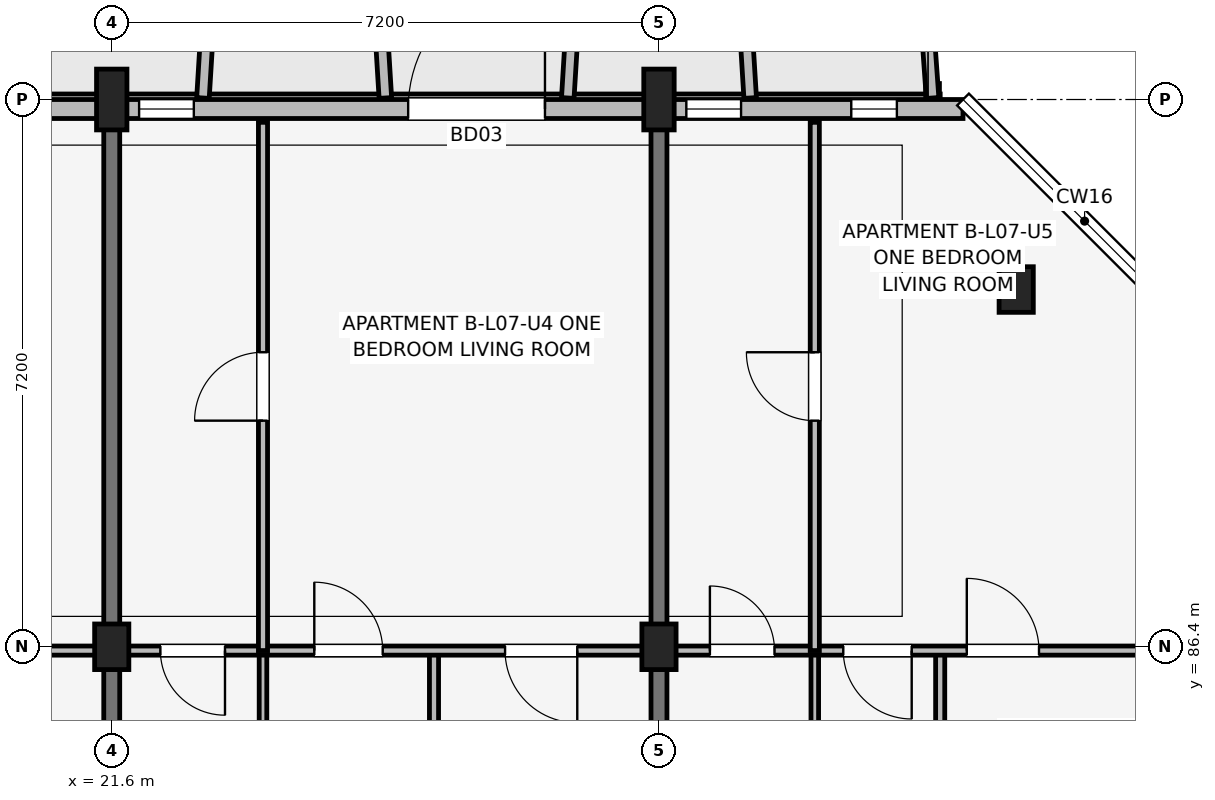
"""IFC4 building model, lengths in metres.
Left out: names, types, materials, properties, quantities, classifications, styles, units other than length and angle.
Written with IfcOpenShell. Run it as: python <this file> out.ifc"""

import sys

from ifc_helpers import new_model, si_unit, direction, frame, frame_2d, origin, origin_2d, place, context, subcontext, project, spatial, rectangle, extrude, element, fill, save


model = new_model("IFC4")
c1 = context("Model", 3, precision=1e-05, world=origin(), true_north=direction((0.0, 1.0)))
c2 = subcontext(c1, "Body", "Model", "MODEL_VIEW")
j1 = project(units=[si_unit("LENGTHUNIT", "METRE"), si_unit("PLANEANGLEUNIT", "RADIAN")], contexts=[c1])
p1 = place(None, origin())
s1 = spatial("IfcSite", under=j1, at=p1, CompositionType="ELEMENT")
p2 = place(p1, origin())
s2 = spatial("IfcBuilding", under=s1, at=p2, CompositionType="ELEMENT")
p3 = place(p2, frame((0.0, 0.0, 24.45)))
s3 = spatial("IfcBuildingStorey", under=s2, at=p3, CompositionType="ELEMENT", Elevation=24.45)
p4 = place(p3, frame((21.6, 86.4, 0.0), z_axis=(0.0, 0.0, 1.0), x_axis=(1.0, 0.0, 0.0)))
e1 = element("IfcColumn", 1, at=p4, inside=s3, PredefinedType="COLUMN", context=c2, shape_type="SweptSolid", body=[
    extrude(rectangle(XDim=0.45, YDim=0.6, at=origin_2d()), origin(), (0.0, 0.0, 1.0), 3.15),
])
p5 = place(p3, frame((21.6, 93.6, 0.0), z_axis=(0.0, 0.0, 1.0), x_axis=(1.0, 0.0, 0.0)))
e2 = element("IfcColumn", 2, at=p5, inside=s3, PredefinedType="COLUMN", context=c2, shape_type="SweptSolid", body=[
    extrude(rectangle(XDim=0.4, YDim=0.8, at=origin_2d()), origin(), (0.0, 0.0, 1.0), 3.15),
])
p6 = place(p3, frame((28.8, 86.4, 0.0), z_axis=(0.0, 0.0, 1.0), x_axis=(1.0, 0.0, 0.0)))
e3 = element("IfcColumn", 3, at=p6, inside=s3, PredefinedType="COLUMN", context=c2, shape_type="SweptSolid", body=[
    extrude(rectangle(XDim=0.45, YDim=0.6, at=origin_2d()), origin(), (0.0, 0.0, 1.0), 3.15),
])
p7 = place(p3, frame((28.8, 93.6, 0.0), z_axis=(0.0, 0.0, 1.0), x_axis=(1.0, 0.0, 0.0)))
e4 = element("IfcColumn", 4, at=p7, inside=s3, PredefinedType="COLUMN", context=c2, shape_type="SweptSolid", body=[
    extrude(rectangle(XDim=0.4, YDim=0.8, at=origin_2d()), origin(), (0.0, 0.0, 1.0), 3.15),
])
p8 = place(p3, frame((33.5, 91.1, 0.0), z_axis=(0.0, 0.0, 1.0), x_axis=(1.0, 0.0, 0.0)))
e5 = element("IfcColumn", 5, at=p8, inside=s3, PredefinedType="COLUMN", context=c2, shape_type="SweptSolid", body=[
    extrude(rectangle(XDim=0.45, YDim=0.6, at=origin_2d()), origin(), (0.0, 0.0, 1.0), 3.15),
])
for number, where, z_axis, x_axis in (
    (6, (21.6, 83.85, 0.0), (0.0, 0.0, 1.0), (0.0, 1.0, 0.0)),
    (7, (28.8, 83.85, 0.0), (0.0, 0.0, 1.0), (0.0, 1.0, 0.0)),
):
    element("IfcWall", number, at=place(p3, frame(where, z_axis=z_axis, x_axis=x_axis)), inside=s3, PredefinedType="SHEAR", context=c2, shape_type="SweptSolid", body=[
        extrude(rectangle(XDim=9.4, YDim=0.21, at=frame_2d((4.7, 0.0))), origin(), (0.0, 0.0, 1.0), 3.15),
    ])
p9 = place(p3, frame((32.8, 93.475, 0.0), z_axis=(0.0, 0.0, 1.0), x_axis=(-1.0, 0.0, 0.0)))
e8 = element("IfcWall", 8, at=p9, inside=s3, PredefinedType="SOLIDWALL", context=c2, shape_type="SweptSolid", body=[
    extrude(rectangle(XDim=29.6, YDim=0.25, at=frame_2d((14.8, 0.0))), origin(), (0.0, 0.0, 1.0), 2.43),
])
p10 = place(p9, frame((21.55, 0.0, 0.0), z_axis=(0.0, 0.0, 1.0), x_axis=(-1.0, 0.0, 0.0)))
e9 = element("IfcOpeningElement", 9, at=p10, cuts=e8, PredefinedType="OPENING", context=c2, shape_type="SweptSolid", body=[
    extrude(rectangle(XDim=1.5, YDim=2.15, at=frame_2d((0.75, 1.075))), frame((0.0, 0.135, 0.0), z_axis=(0.0, -1.0, 0.0), x_axis=(1.0, 0.0, 0.0)), (0.0, 0.0, 1.0), 0.27),
])
p11 = place(p9, frame((7.3, 0.0, 0.0), z_axis=(0.0, 0.0, 1.0), x_axis=(-1.0, 0.0, 0.0)))
e10 = element("IfcOpeningElement", 10, at=p11, cuts=e8, PredefinedType="OPENING", context=c2, shape_type="SweptSolid", body=[
    extrude(rectangle(XDim=1.8, YDim=2.15, at=frame_2d((0.9, 1.075))), frame((0.0, 0.135, 0.0), z_axis=(0.0, -1.0, 0.0), x_axis=(1.0, 0.0, 0.0)), (0.0, 0.0, 1.0), 0.27),
])
p12 = place(p9, frame((27.57, 0.0, 0.7)))
e11 = element("IfcOpeningElement", 11, at=p12, cuts=e8, PredefinedType="OPENING", context=c2, shape_type="SweptSolid", body=[
    extrude(rectangle(XDim=1.46, YDim=1.55, at=frame_2d((0.73, 0.775))), frame((0.0, 0.135, 0.0), z_axis=(0.0, -1.0, 0.0), x_axis=(1.0, 0.0, 0.0)), (0.0, 0.0, 1.0), 0.27),
])
p13 = place(p9, frame((26.02, 0.0, 0.75)))
e12 = element("IfcOpeningElement", 12, at=p13, cuts=e8, PredefinedType="OPENING", context=c2, shape_type="SweptSolid", body=[
    extrude(rectangle(XDim=0.6, YDim=1.25, at=frame_2d((0.3, 0.625))), frame((0.0, 0.135, 0.0), z_axis=(0.0, -1.0, 0.0), x_axis=(1.0, 0.0, 0.0)), (0.0, 0.0, 1.0), 0.27),
])
p14 = place(p9, frame((24.52, 0.0, 0.75)))
e13 = element("IfcOpeningElement", 13, at=p14, cuts=e8, PredefinedType="OPENING", context=c2, shape_type="SweptSolid", body=[
    extrude(rectangle(XDim=0.72, YDim=1.35, at=frame_2d((0.36, 0.675))), frame((0.0, 0.135, 0.0), z_axis=(0.0, -1.0, 0.0), x_axis=(1.0, 0.0, 0.0)), (0.0, 0.0, 1.0), 0.27),
])
p15 = place(p9, frame((14.925, 0.0, 0.67)))
e14 = element("IfcOpeningElement", 14, at=p15, cuts=e8, PredefinedType="OPENING", context=c2, shape_type="SweptSolid", body=[
    extrude(rectangle(XDim=2.15, YDim=1.65, at=frame_2d((1.075, 0.825))), frame((0.0, 0.135, 0.0), z_axis=(0.0, -1.0, 0.0), x_axis=(1.0, 0.0, 0.0)), (0.0, 0.0, 1.0), 0.27),
])
p16 = place(p9, frame((12.815, 0.0, 0.75)))
e15 = element("IfcOpeningElement", 15, at=p16, cuts=e8, PredefinedType="OPENING", context=c2, shape_type="SweptSolid", body=[
    extrude(rectangle(XDim=1.22, YDim=1.5, at=frame_2d((0.61, 0.75))), frame((0.0, 0.135, 0.0), z_axis=(0.0, -1.0, 0.0), x_axis=(1.0, 0.0, 0.0)), (0.0, 0.0, 1.0), 0.27),
])
p17 = place(p9, frame((10.12, 0.0, 0.75)))
e16 = element("IfcOpeningElement", 16, at=p17, cuts=e8, PredefinedType="OPENING", context=c2, shape_type="SweptSolid", body=[
    extrude(rectangle(XDim=0.72, YDim=1.35, at=frame_2d((0.36, 0.675))), frame((0.0, 0.135, 0.0), z_axis=(0.0, -1.0, 0.0), x_axis=(1.0, 0.0, 0.0)), (0.0, 0.0, 1.0), 0.27),
])
p18 = place(p9, frame((2.92, 0.0, 0.75)))
e17 = element("IfcOpeningElement", 17, at=p18, cuts=e8, PredefinedType="OPENING", context=c2, shape_type="SweptSolid", body=[
    extrude(rectangle(XDim=0.72, YDim=1.35, at=frame_2d((0.36, 0.675))), frame((0.0, 0.135, 0.0), z_axis=(0.0, -1.0, 0.0), x_axis=(1.0, 0.0, 0.0)), (0.0, 0.0, 1.0), 0.27),
])
p19 = place(p9, frame((0.87, 0.0, 0.75)))
e18 = element("IfcOpeningElement", 18, at=p19, cuts=e8, PredefinedType="OPENING", context=c2, shape_type="SweptSolid", body=[
    extrude(rectangle(XDim=0.6, YDim=1.25, at=frame_2d((0.3, 0.625))), frame((0.0, 0.135, 0.0), z_axis=(0.0, -1.0, 0.0), x_axis=(1.0, 0.0, 0.0)), (0.0, 0.0, 1.0), 0.27),
])
for number, where, z_axis, x_axis in (
    (19, (22.8, 93.62, 0.0), (0.0, 0.0, 1.0), (0.061, 0.998, 0.0)),
    (20, (25.2, 93.62, 0.0), (0.0, 0.0, 1.0), (-0.061, 0.998, 0.0)),
    (21, (27.6, 93.62, 0.0), (0.0, 0.0, 1.0), (0.061, 0.998, 0.0)),
):
    element("IfcWall", number, at=place(p3, frame(where, z_axis=z_axis, x_axis=x_axis)), inside=s3, PredefinedType="ELEMENTEDWALL", context=c2, shape_type="SweptSolid", body=[
        extrude(rectangle(XDim=1.964, YDim=0.165, at=frame_2d((0.982, 0.0))), origin(), (0.0, 0.0, 1.0), 2.58),
    ])
p20 = place(p3, frame((30.0, 93.62, 0.0), z_axis=(0.0, 0.0, 1.0), x_axis=(-0.061170732449, 0.998127317276, 0.0)))
e22 = element("IfcWall", 22, at=p20, inside=s3, PredefinedType="ELEMENTEDWALL", context=c2, shape_type="SweptSolid", body=[
    extrude(rectangle(XDim=1.964, YDim=0.165, at=frame_2d((0.982, 0.0))), origin(), (0.0, 0.0, 1.0), 2.95),
])
p21 = place(p3, frame((32.4, 93.62, 0.0), z_axis=(0.0, 0.0, 1.0), x_axis=(-0.071194071069, 0.997462482625, 0.0)))
e23 = element("IfcWall", 23, at=p21, inside=s3, PredefinedType="ELEMENTEDWALL", context=c2, shape_type="SweptSolid", body=[
    extrude(rectangle(XDim=1.965, YDim=0.165, at=frame_2d((0.982, 0.0))), origin(), (0.0, 0.0, 1.0), 2.95),
])
p22 = place(p3, frame((14.54, 86.35, 0.0), z_axis=(0.0, 0.0, 1.0), x_axis=(1.0, 0.0, 0.0)))
e24 = element("IfcWall", 24, at=p22, inside=s3, PredefinedType="PARTITIONING", context=c2, shape_type="SweptSolid", body=[
    extrude(rectangle(XDim=6.92, YDim=0.12, at=frame_2d((3.46, 0.0))), origin(), (0.0, 0.0, 1.0), 2.38),
])
p23 = place(p22, frame((0.5, 0.0, 0.0)))
e25 = element("IfcOpeningElement", 25, at=p23, cuts=e24, PredefinedType="OPENING", context=c2, shape_type="SweptSolid", body=[
    extrude(rectangle(XDim=0.85, YDim=2.08, at=frame_2d((0.425, 1.04))), frame((0.0, 0.07, 0.0), z_axis=(0.0, -1.0, 0.0), x_axis=(1.0, 0.0, 0.0)), (0.0, 0.0, 1.0), 0.14),
])
p24 = place(p22, frame((3.275, 0.0, 0.0), z_axis=(0.0, 0.0, 1.0), x_axis=(-1.0, 0.0, 0.0)))
e26 = element("IfcOpeningElement", 26, at=p24, cuts=e24, PredefinedType="OPENING", context=c2, shape_type="SweptSolid", body=[
    extrude(rectangle(XDim=0.9, YDim=2.08, at=frame_2d((0.45, 1.04))), frame((0.0, 0.07, 0.0), z_axis=(0.0, -1.0, 0.0), x_axis=(1.0, 0.0, 0.0)), (0.0, 0.0, 1.0), 0.14),
])
p25 = place(p22, frame((4.885, 0.0, 0.0)))
e27 = element("IfcOpeningElement", 27, at=p25, cuts=e24, PredefinedType="OPENING", context=c2, shape_type="SweptSolid", body=[
    extrude(rectangle(XDim=0.95, YDim=2.08, at=frame_2d((0.475, 1.04))), frame((0.0, 0.07, 0.0), z_axis=(0.0, -1.0, 0.0), x_axis=(1.0, 0.0, 0.0)), (0.0, 0.0, 1.0), 0.14),
])
p26 = place(p3, frame((23.59, 83.7, 0.0), z_axis=(0.0, 0.0, 1.0), x_axis=(0.0, 1.0, 0.0)))
e28 = element("IfcWall", 28, at=p26, inside=s3, PredefinedType="PARTITIONING", context=c2, shape_type="SweptSolid", body=[
    extrude(rectangle(XDim=2.65, YDim=0.1, at=frame_2d((1.325, 0.0))), origin(), (0.0, 0.0, 1.0), 2.38),
])
p27 = place(p3, frame((25.84, 83.7, 0.0), z_axis=(0.0, 0.0, 1.0), x_axis=(0.0, 1.0, 0.0)))
e29 = element("IfcWall", 29, at=p27, inside=s3, PredefinedType="PARTITIONING", context=c2, shape_type="SweptSolid", body=[
    extrude(rectangle(XDim=2.65, YDim=0.12, at=frame_2d((1.325, 0.0))), origin(), (0.0, 0.0, 1.0), 2.38),
])
p28 = place(p3, frame((21.74, 86.35, 0.0), z_axis=(0.0, 0.0, 1.0), x_axis=(1.0, 0.0, 0.0)))
e30 = element("IfcWall", 30, at=p28, inside=s3, PredefinedType="PARTITIONING", context=c2, shape_type="SweptSolid", body=[
    extrude(rectangle(XDim=6.92, YDim=0.12, at=frame_2d((3.46, 0.0))), origin(), (0.0, 0.0, 1.0), 2.38),
])
p29 = place(p28, frame((1.35, 0.0, 0.0), z_axis=(0.0, 0.0, 1.0), x_axis=(-1.0, 0.0, 0.0)))
e31 = element("IfcOpeningElement", 31, at=p29, cuts=e30, PredefinedType="OPENING", context=c2, shape_type="SweptSolid", body=[
    extrude(rectangle(XDim=0.85, YDim=2.08, at=frame_2d((0.425, 1.04))), frame((0.0, 0.07, 0.0), z_axis=(0.0, -1.0, 0.0), x_axis=(1.0, 0.0, 0.0)), (0.0, 0.0, 1.0), 0.14),
])
p30 = place(p28, frame((2.525, 0.0, 0.0)))
e32 = element("IfcOpeningElement", 32, at=p30, cuts=e30, PredefinedType="OPENING", context=c2, shape_type="SweptSolid", body=[
    extrude(rectangle(XDim=0.9, YDim=2.08, at=frame_2d((0.45, 1.04))), frame((0.0, 0.07, 0.0), z_axis=(0.0, -1.0, 0.0), x_axis=(1.0, 0.0, 0.0)), (0.0, 0.0, 1.0), 0.14),
])
p31 = place(p28, frame((5.985, 0.0, 0.0), z_axis=(0.0, 0.0, 1.0), x_axis=(-1.0, 0.0, 0.0)))
e33 = element("IfcOpeningElement", 33, at=p31, cuts=e30, PredefinedType="OPENING", context=c2, shape_type="SweptSolid", body=[
    extrude(rectangle(XDim=0.95, YDim=2.08, at=frame_2d((0.475, 1.04))), frame((0.0, 0.07, 0.0), z_axis=(0.0, -1.0, 0.0), x_axis=(1.0, 0.0, 0.0)), (0.0, 0.0, 1.0), 0.14),
])
p32 = place(p3, frame((23.59, 86.35, 0.0), z_axis=(0.0, 0.0, 1.0), x_axis=(0.0, 1.0, 0.0)))
e34 = element("IfcWall", 34, at=p32, inside=s3, PredefinedType="PARTITIONING", context=c2, shape_type="SweptSolid", body=[
    extrude(rectangle(XDim=6.95, YDim=0.12, at=frame_2d((3.475, 0.0))), origin(), (0.0, 0.0, 1.0), 2.38),
])
p33 = place(p32, frame((3.025, 0.0, 0.0)))
e35 = element("IfcOpeningElement", 35, at=p33, cuts=e34, PredefinedType="OPENING", context=c2, shape_type="SweptSolid", body=[
    extrude(rectangle(XDim=0.9, YDim=2.08, at=frame_2d((0.45, 1.04))), frame((0.0, 0.07, 0.0), z_axis=(0.0, -1.0, 0.0), x_axis=(1.0, 0.0, 0.0)), (0.0, 0.0, 1.0), 0.14),
])
p34 = place(p3, frame((30.85, 83.7, 0.0), z_axis=(0.0, 0.0, 1.0), x_axis=(0.0, 1.0, 0.0)))
e36 = element("IfcWall", 36, at=p34, inside=s3, PredefinedType="PARTITIONING", context=c2, shape_type="SweptSolid", body=[
    extrude(rectangle(XDim=2.65, YDim=0.1, at=frame_2d((1.325, 0.0))), origin(), (0.0, 0.0, 1.0), 2.38),
])
p35 = place(p3, frame((32.5, 83.7, 0.0), z_axis=(0.0, 0.0, 1.0), x_axis=(0.0, 1.0, 0.0)))
e37 = element("IfcWall", 37, at=p35, inside=s3, PredefinedType="PARTITIONING", context=c2, shape_type="SweptSolid", body=[
    extrude(rectangle(XDim=2.65, YDim=0.12, at=frame_2d((1.325, 0.0))), origin(), (0.0, 0.0, 1.0), 2.38),
])
p36 = place(p3, frame((28.94, 86.35, 0.0), z_axis=(0.0, 0.0, 1.0), x_axis=(1.0, 0.0, 0.0)))
e38 = element("IfcWall", 38, at=p36, inside=s3, PredefinedType="PARTITIONING", context=c2, shape_type="SweptSolid", body=[
    extrude(rectangle(XDim=6.92, YDim=0.12, at=frame_2d((3.46, 0.0))), origin(), (0.0, 0.0, 1.0), 2.38),
])
p37 = place(p36, frame((0.53, 0.0, 0.0)))
e39 = element("IfcOpeningElement", 39, at=p37, cuts=e38, PredefinedType="OPENING", context=c2, shape_type="SweptSolid", body=[
    extrude(rectangle(XDim=0.85, YDim=2.08, at=frame_2d((0.425, 1.04))), frame((0.0, 0.07, 0.0), z_axis=(0.0, -1.0, 0.0), x_axis=(1.0, 0.0, 0.0)), (0.0, 0.0, 1.0), 0.14),
])
p38 = place(p36, frame((3.185, 0.0, 0.0), z_axis=(0.0, 0.0, 1.0), x_axis=(-1.0, 0.0, 0.0)))
e40 = element("IfcOpeningElement", 40, at=p38, cuts=e38, PredefinedType="OPENING", context=c2, shape_type="SweptSolid", body=[
    extrude(rectangle(XDim=0.9, YDim=2.08, at=frame_2d((0.45, 1.04))), frame((0.0, 0.07, 0.0), z_axis=(0.0, -1.0, 0.0), x_axis=(1.0, 0.0, 0.0)), (0.0, 0.0, 1.0), 0.14),
])
p39 = place(p36, frame((3.91, 0.0, 0.0)))
e41 = element("IfcOpeningElement", 41, at=p39, cuts=e38, PredefinedType="OPENING", context=c2, shape_type="SweptSolid", body=[
    extrude(rectangle(XDim=0.95, YDim=2.08, at=frame_2d((0.475, 1.04))), frame((0.0, 0.07, 0.0), z_axis=(0.0, -1.0, 0.0), x_axis=(1.0, 0.0, 0.0)), (0.0, 0.0, 1.0), 0.14),
])
p40 = place(p3, frame((30.85, 86.35, 0.0), z_axis=(0.0, 0.0, 1.0), x_axis=(0.0, 1.0, 0.0)))
e42 = element("IfcWall", 42, at=p40, inside=s3, PredefinedType="PARTITIONING", context=c2, shape_type="SweptSolid", body=[
    extrude(rectangle(XDim=6.95, YDim=0.12, at=frame_2d((3.475, 0.0))), origin(), (0.0, 0.0, 1.0), 2.38),
])
p41 = place(p40, frame((3.025, 0.0, 0.0)))
e43 = element("IfcOpeningElement", 43, at=p41, cuts=e42, PredefinedType="OPENING", context=c2, shape_type="SweptSolid", body=[
    extrude(rectangle(XDim=0.9, YDim=2.08, at=frame_2d((0.45, 1.04))), frame((0.0, 0.07, 0.0), z_axis=(0.0, -1.0, 0.0), x_axis=(1.0, 0.0, 0.0)), (0.0, 0.0, 1.0), 0.14),
])
p42 = place(p11, origin())
e44 = element("IfcDoor", 44, at=p42, inside=s3, OperationType="SINGLE_SWING_LEFT", PredefinedType="DOOR", context=c2, shape_type="SweptSolid", body=[
    extrude(rectangle(XDim=1.8, YDim=2.15, at=frame_2d((0.9, 1.075))), frame((0.0, 0.025, 0.0), z_axis=(0.0, -1.0, 0.0), x_axis=(1.0, 0.0, 0.0)), (0.0, 0.0, 1.0), 0.05),
])
fill(e10, e44)
p43 = place(p17, origin())
e45 = element("IfcWindow", 45, at=p43, inside=s3, PartitioningType="SINGLE_PANEL", PredefinedType="WINDOW", context=c2, shape_type="SweptSolid", body=[
    extrude(rectangle(XDim=0.72, YDim=1.35, at=frame_2d((0.36, 0.675))), frame((0.0, 0.03, 0.0), z_axis=(0.0, -1.0, 0.0), x_axis=(1.0, 0.0, 0.0)), (0.0, 0.0, 1.0), 0.06),
])
fill(e16, e45)
p44 = place(p18, origin())
e46 = element("IfcWindow", 46, at=p44, inside=s3, PartitioningType="SINGLE_PANEL", PredefinedType="WINDOW", context=c2, shape_type="SweptSolid", body=[
    extrude(rectangle(XDim=0.72, YDim=1.35, at=frame_2d((0.36, 0.675))), frame((0.0, 0.03, 0.0), z_axis=(0.0, -1.0, 0.0), x_axis=(1.0, 0.0, 0.0)), (0.0, 0.0, 1.0), 0.06),
])
fill(e17, e46)
p45 = place(p19, origin())
e47 = element("IfcWindow", 47, at=p45, inside=s3, PartitioningType="SINGLE_PANEL", PredefinedType="WINDOW", context=c2, shape_type="SweptSolid", body=[
    extrude(rectangle(XDim=0.6, YDim=1.25, at=frame_2d((0.3, 0.625))), frame((0.0, 0.03, 0.0), z_axis=(0.0, -1.0, 0.0), x_axis=(1.0, 0.0, 0.0)), (0.0, 0.0, 1.0), 0.06),
])
fill(e18, e47)
p46 = place(p29, origin())
e48 = element("IfcDoor", 48, at=p46, inside=s3, OperationType="SINGLE_SWING_RIGHT", PredefinedType="DOOR", context=c2, shape_type="SweptSolid", body=[
    extrude(rectangle(XDim=0.85, YDim=2.08, at=frame_2d((0.425, 1.04))), frame((0.0, 0.025, 0.0), z_axis=(0.0, -1.0, 0.0), x_axis=(1.0, 0.0, 0.0)), (0.0, 0.0, 1.0), 0.05),
])
fill(e31, e48)
p47 = place(p30, origin())
e49 = element("IfcDoor", 49, at=p47, inside=s3, OperationType="SINGLE_SWING_LEFT", PredefinedType="DOOR", context=c2, shape_type="SweptSolid", body=[
    extrude(rectangle(XDim=0.9, YDim=2.08, at=frame_2d((0.45, 1.04))), frame((0.0, 0.025, 0.0), z_axis=(0.0, -1.0, 0.0), x_axis=(1.0, 0.0, 0.0)), (0.0, 0.0, 1.0), 0.05),
])
fill(e32, e49)
p48 = place(p31, origin())
e50 = element("IfcDoor", 50, at=p48, inside=s3, OperationType="SINGLE_SWING_RIGHT", PredefinedType="DOOR", context=c2, shape_type="SweptSolid", body=[
    extrude(rectangle(XDim=0.95, YDim=2.08, at=frame_2d((0.475, 1.04))), frame((0.0, 0.025, 0.0), z_axis=(0.0, -1.0, 0.0), x_axis=(1.0, 0.0, 0.0)), (0.0, 0.0, 1.0), 0.05),
])
fill(e33, e50)
p49 = place(p33, origin())
e51 = element("IfcDoor", 51, at=p49, inside=s3, OperationType="SINGLE_SWING_LEFT", PredefinedType="DOOR", context=c2, shape_type="SweptSolid", body=[
    extrude(rectangle(XDim=0.9, YDim=2.08, at=frame_2d((0.45, 1.04))), frame((0.0, 0.025, 0.0), z_axis=(0.0, -1.0, 0.0), x_axis=(1.0, 0.0, 0.0)), (0.0, 0.0, 1.0), 0.05),
])
fill(e35, e51)
p50 = place(p37, origin())
e52 = element("IfcDoor", 52, at=p50, inside=s3, OperationType="SINGLE_SWING_LEFT", PredefinedType="DOOR", context=c2, shape_type="SweptSolid", body=[
    extrude(rectangle(XDim=0.85, YDim=2.08, at=frame_2d((0.425, 1.04))), frame((0.0, 0.025, 0.0), z_axis=(0.0, -1.0, 0.0), x_axis=(1.0, 0.0, 0.0)), (0.0, 0.0, 1.0), 0.05),
])
fill(e39, e52)
p51 = place(p38, origin())
e53 = element("IfcDoor", 53, at=p51, inside=s3, OperationType="SINGLE_SWING_RIGHT", PredefinedType="DOOR", context=c2, shape_type="SweptSolid", body=[
    extrude(rectangle(XDim=0.9, YDim=2.08, at=frame_2d((0.45, 1.04))), frame((0.0, 0.025, 0.0), z_axis=(0.0, -1.0, 0.0), x_axis=(1.0, 0.0, 0.0)), (0.0, 0.0, 1.0), 0.05),
])
fill(e40, e53)
p52 = place(p39, origin())
e54 = element("IfcDoor", 54, at=p52, inside=s3, OperationType="SINGLE_SWING_LEFT", PredefinedType="DOOR", context=c2, shape_type="SweptSolid", body=[
    extrude(rectangle(XDim=0.95, YDim=2.08, at=frame_2d((0.475, 1.04))), frame((0.0, 0.025, 0.0), z_axis=(0.0, -1.0, 0.0), x_axis=(1.0, 0.0, 0.0)), (0.0, 0.0, 1.0), 0.05),
])
fill(e41, e54)
p53 = place(p41, origin())
e55 = element("IfcDoor", 55, at=p53, inside=s3, OperationType="SINGLE_SWING_RIGHT", PredefinedType="DOOR", context=c2, shape_type="SweptSolid", body=[
    extrude(rectangle(XDim=0.9, YDim=2.08, at=frame_2d((0.45, 1.04))), frame((0.0, 0.025, 0.0), z_axis=(0.0, -1.0, 0.0), x_axis=(1.0, 0.0, 0.0)), (0.0, 0.0, 1.0), 0.05),
])
fill(e43, e55)
save(model, sys.argv[1])
